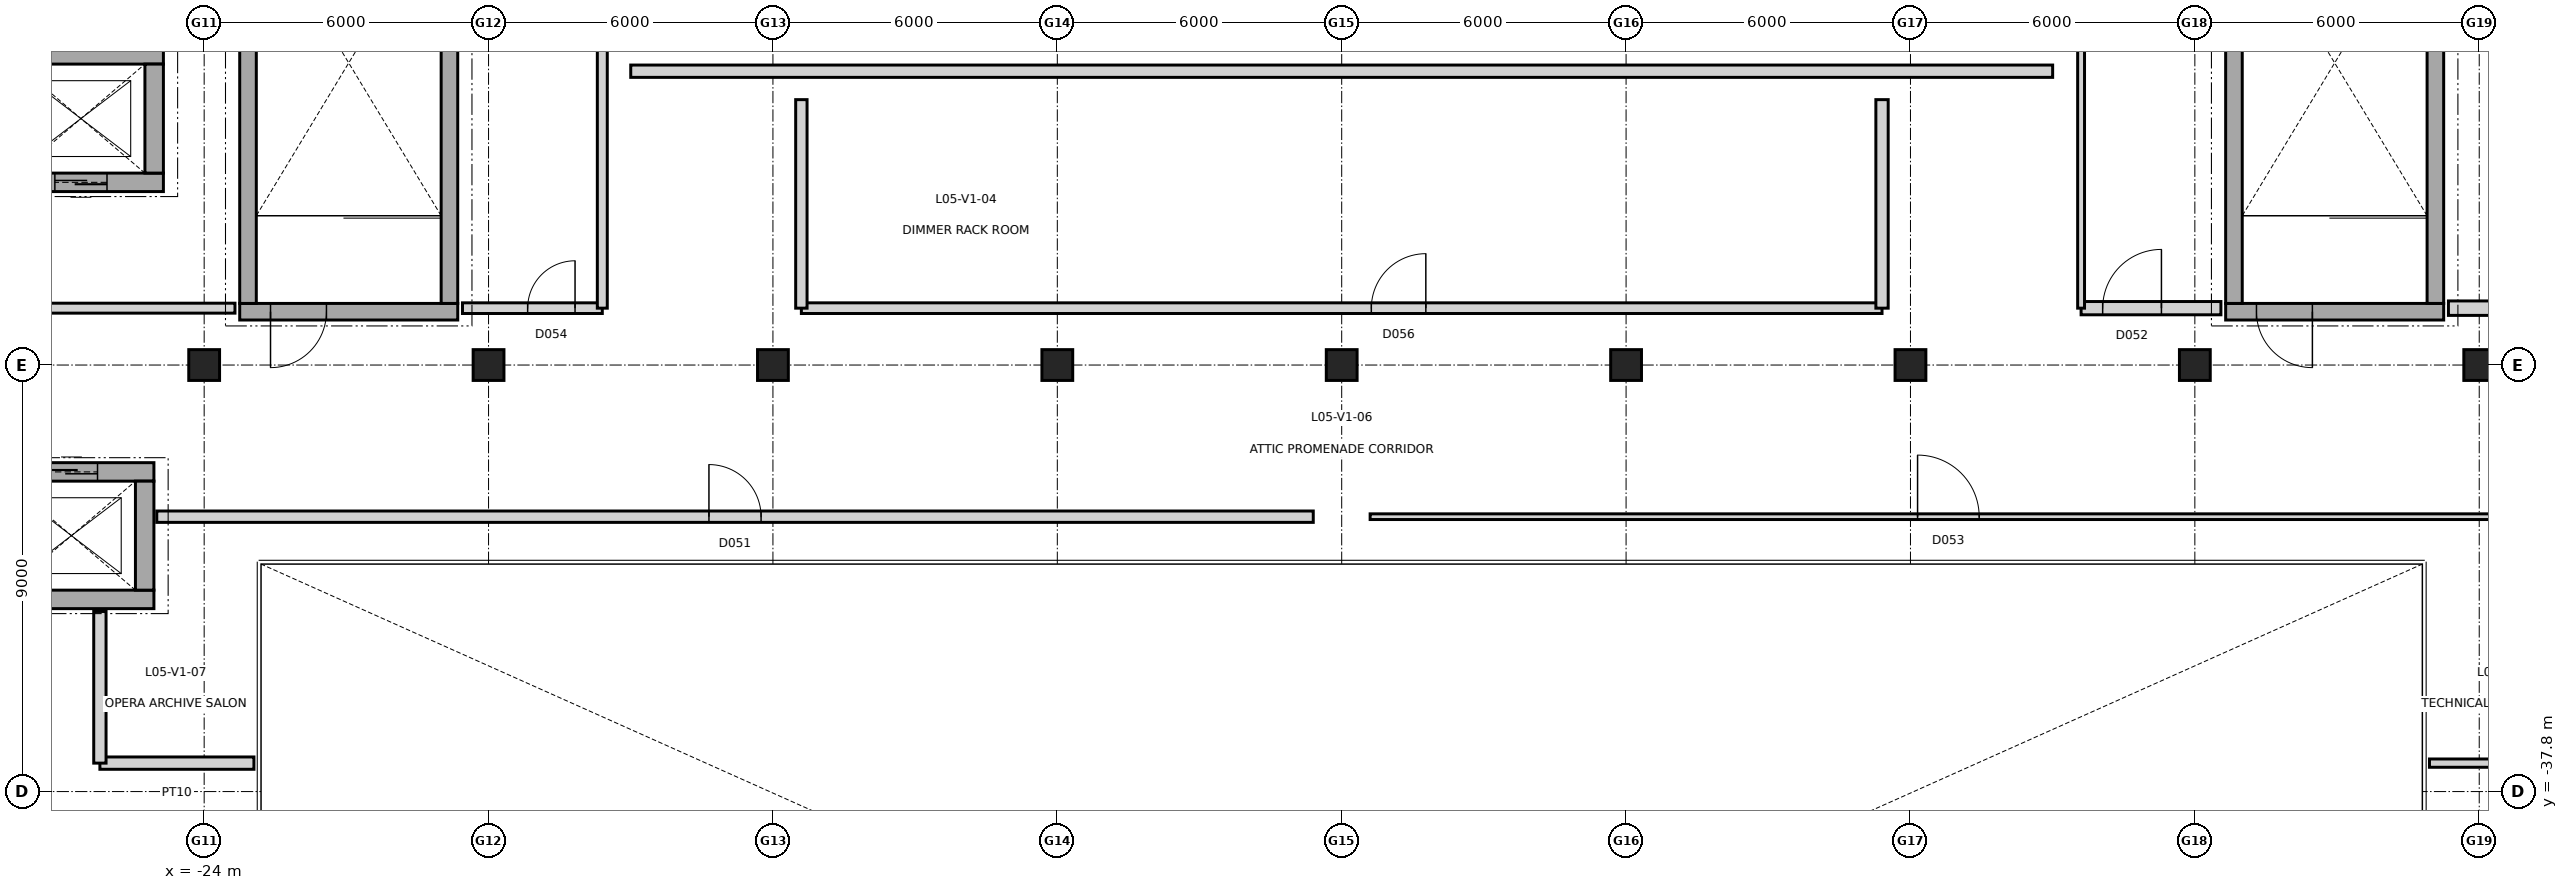
"""IFC4 building model, lengths in metres.
Left out: names, types, materials, properties, quantities, classifications, styles, units other than length and angle.
Written with IfcOpenShell. Run it as: python <this file> out.ifc"""

import sys

from ifc_helpers import new_model, si_unit, direction, frame, frame_2d, origin, origin_2d, place, context, subcontext, project, spatial, rectangle, extrude, element, fill, save


model = new_model("IFC4")
c1 = context("Model", 3, precision=1e-05, world=origin(), true_north=direction((0.0, 1.0)))
c2 = subcontext(c1, "Body", "Model", "MODEL_VIEW")
j1 = project(units=[si_unit("LENGTHUNIT", "METRE"), si_unit("PLANEANGLEUNIT", "RADIAN")], contexts=[c1])
p1 = place(None, origin())
s1 = spatial("IfcSite", under=j1, at=p1, CompositionType="ELEMENT")
p2 = place(p1, origin())
s2 = spatial("IfcBuilding", under=s1, at=p2, CompositionType="ELEMENT")
p3 = place(p2, frame((0.0, 0.0, 24.6)))
s3 = spatial("IfcBuildingStorey", under=s2, at=p3, CompositionType="ELEMENT", Elevation=24.6)
for number, where, z_axis, x_axis in (
    (1, (-24.0, -28.8, 0.0), (0.0, 0.0, 1.0), (1.0, 0.0, 0.0)),
    (2, (-18.0, -28.8, 0.0), (0.0, 0.0, 1.0), (1.0, 0.0, 0.0)),
    (3, (-12.0, -28.8, 0.0), (0.0, 0.0, 1.0), (1.0, 0.0, 0.0)),
    (4, (-6.0, -28.8, 0.0), (0.0, 0.0, 1.0), (1.0, 0.0, 0.0)),
    (5, (0.0, -28.8, 0.0), (0.0, 0.0, 1.0), (1.0, 0.0, 0.0)),
    (6, (6.0, -28.8, 0.0), (0.0, 0.0, 1.0), (1.0, 0.0, 0.0)),
    (7, (12.0, -28.8, 0.0), (0.0, 0.0, 1.0), (1.0, 0.0, 0.0)),
    (8, (18.0, -28.8, 0.0), (0.0, 0.0, 1.0), (1.0, 0.0, 0.0)),
    (9, (24.0, -28.8, 0.0), (0.0, 0.0, 1.0), (1.0, 0.0, 0.0)),
):
    element("IfcColumn", number, at=place(p3, frame(where, z_axis=z_axis, x_axis=x_axis)), inside=s3, PredefinedType="COLUMN", context=c2, shape_type="SweptSolid", body=[
        extrude(rectangle(XDim=0.65, YDim=0.65, at=origin_2d()), origin(), (0.0, 0.0, 1.0), 5.4),
    ])
p4 = place(p3, frame((-18.65, -27.675, 0.0), z_axis=(0.0, 0.0, 1.0), x_axis=(-1.0, 0.0, 0.0)))
e10 = element("IfcWall", 10, at=p4, inside=s3, PredefinedType="SHEAR", context=c2, shape_type="SweptSolid", body=[
    extrude(rectangle(XDim=4.6, YDim=0.35, at=frame_2d((2.3, 0.0))), origin(), (0.0, 0.0, 1.0), 4.645),
])
p5 = place(p4, frame((2.77, 0.0, 0.0)))
e11 = element("IfcOpeningElement", 11, at=p5, cuts=e10, PredefinedType="OPENING", context=c2, shape_type="SweptSolid", body=[
    extrude(rectangle(XDim=1.18, YDim=2.15, at=frame_2d((0.59, 1.075))), frame((0.0, 0.185, 0.0), z_axis=(0.0, -1.0, 0.0), x_axis=(1.0, 0.0, 0.0)), (0.0, 0.0, 1.0), 0.37),
])
for number, where, z_axis, x_axis in (
    (12, (-23.075, -27.5, 0.0), (0.0, 0.0, 1.0), (0.0, 1.0, 0.0)),
    (13, (-18.825, -19.2, 0.0), (0.0, 0.0, 1.0), (0.0, -1.0, 0.0)),
):
    element("IfcWall", number, at=place(p3, frame(where, z_axis=z_axis, x_axis=x_axis)), inside=s3, PredefinedType="SHEAR", context=c2, shape_type="SweptSolid", body=[
        extrude(rectangle(XDim=8.3, YDim=0.35, at=frame_2d((4.15, 0.0))), origin(), (0.0, 0.0, 1.0), 4.645),
    ])
p6 = place(p3, frame((23.25, -27.675, 0.0), z_axis=(0.0, 0.0, 1.0), x_axis=(-1.0, 0.0, 0.0)))
e14 = element("IfcWall", 14, at=p6, inside=s3, PredefinedType="SHEAR", context=c2, shape_type="SweptSolid", body=[
    extrude(rectangle(XDim=4.6, YDim=0.35, at=frame_2d((2.3, 0.0))), origin(), (0.0, 0.0, 1.0), 4.645),
])
p7 = place(p6, frame((2.77, 0.0, 0.0)))
e15 = element("IfcOpeningElement", 15, at=p7, cuts=e14, PredefinedType="OPENING", context=c2, shape_type="SweptSolid", body=[
    extrude(rectangle(XDim=1.18, YDim=2.15, at=frame_2d((0.59, 1.075))), frame((0.0, 0.185, 0.0), z_axis=(0.0, -1.0, 0.0), x_axis=(1.0, 0.0, 0.0)), (0.0, 0.0, 1.0), 0.37),
])
for number, where, z_axis, x_axis in (
    (16, (18.825, -27.5, 0.0), (0.0, 0.0, 1.0), (0.0, 1.0, 0.0)),
    (17, (23.075, -19.2, 0.0), (0.0, 0.0, 1.0), (0.0, -1.0, 0.0)),
):
    element("IfcWall", number, at=place(p3, frame(where, z_axis=z_axis, x_axis=x_axis)), inside=s3, PredefinedType="SHEAR", context=c2, shape_type="SweptSolid", body=[
        extrude(rectangle(XDim=8.3, YDim=0.35, at=frame_2d((4.15, 0.0))), origin(), (0.0, 0.0, 1.0), 4.645),
    ])
p8 = place(p3, frame((-24.86, -24.945, 0.0), z_axis=(0.0, 0.0, 1.0), x_axis=(-1.0, 0.0, 0.0)))
e18 = element("IfcWall", 18, at=p8, inside=s3, PredefinedType="SHEAR", context=c2, shape_type="SweptSolid", body=[
    extrude(rectangle(XDim=3.48, YDim=0.39, at=frame_2d((1.74, 0.0))), origin(), (0.0, 0.0, 1.0), 4.645),
])
p9 = place(p8, frame((1.19, 0.0, 0.0)))
e19 = element("IfcOpeningElement", 19, at=p9, cuts=e18, PredefinedType="OPENING", context=c2, shape_type="SweptSolid", body=[
    extrude(rectangle(XDim=1.1, YDim=2.15, at=frame_2d((0.55, 1.075))), frame((0.0, 0.205, 0.0), z_axis=(0.0, -1.0, 0.0), x_axis=(1.0, 0.0, 0.0)), (0.0, 0.0, 1.0), 0.41),
])
p10 = place(p3, frame((-28.34, -22.255, 0.0), z_axis=(0.0, 0.0, 1.0), x_axis=(1.0, 0.0, 0.0)))
e20 = element("IfcWall", 20, at=p10, inside=s3, PredefinedType="SHEAR", context=c2, shape_type="SweptSolid", body=[
    extrude(rectangle(XDim=3.48, YDim=0.39, at=frame_2d((1.74, 0.0))), origin(), (0.0, 0.0, 1.0), 4.645),
])
p11 = place(p3, frame((-25.055, -22.45, 0.0), z_axis=(0.0, 0.0, 1.0), x_axis=(0.0, -1.0, 0.0)))
e21 = element("IfcWall", 21, at=p11, inside=s3, PredefinedType="SHEAR", context=c2, shape_type="SweptSolid", body=[
    extrude(rectangle(XDim=2.3, YDim=0.39, at=frame_2d((1.15, 0.0))), origin(), (0.0, 0.0, 1.0), 4.645),
])
p12 = place(p3, frame((-25.06, -33.745, 0.0), z_axis=(0.0, 0.0, 1.0), x_axis=(-1.0, 0.0, 0.0)))
e22 = element("IfcWall", 22, at=p12, inside=s3, PredefinedType="SHEAR", context=c2, shape_type="SweptSolid", body=[
    extrude(rectangle(XDim=3.48, YDim=0.39, at=frame_2d((1.74, 0.0))), origin(), (0.0, 0.0, 1.0), 3.619),
])
p13 = place(p3, frame((-28.54, -31.055, 0.0), z_axis=(0.0, 0.0, 1.0), x_axis=(1.0, 0.0, 0.0)))
e23 = element("IfcWall", 23, at=p13, inside=s3, PredefinedType="SHEAR", context=c2, shape_type="SweptSolid", body=[
    extrude(rectangle(XDim=3.48, YDim=0.39, at=frame_2d((1.74, 0.0))), origin(), (0.0, 0.0, 1.0), 3.619),
])
p14 = place(p13, frame((1.19, 0.0, 0.0)))
e24 = element("IfcOpeningElement", 24, at=p14, cuts=e23, PredefinedType="OPENING", context=c2, shape_type="SweptSolid", body=[
    extrude(rectangle(XDim=1.1, YDim=2.15, at=frame_2d((0.55, 1.075))), frame((0.0, 0.205, 0.0), z_axis=(0.0, -1.0, 0.0), x_axis=(1.0, 0.0, 0.0)), (0.0, 0.0, 1.0), 0.41),
])
p15 = place(p3, frame((-25.255, -31.25, 0.0), z_axis=(0.0, 0.0, 1.0), x_axis=(0.0, -1.0, 0.0)))
e25 = element("IfcWall", 25, at=p15, inside=s3, PredefinedType="SHEAR", context=c2, shape_type="SweptSolid", body=[
    extrude(rectangle(XDim=2.3, YDim=0.39, at=frame_2d((1.15, 0.0))), origin(), (0.0, 0.0, 1.0), 3.619),
])
p16 = place(p3, frame((-26.2, -37.2, 0.0), z_axis=(0.0, 0.0, 1.0), x_axis=(1.0, 0.0, 0.0)))
e26 = element("IfcWall", 26, at=p16, inside=s3, PredefinedType="PARTITIONING", context=c2, shape_type="SweptSolid", body=[
    extrude(rectangle(XDim=3.25, YDim=0.26, at=frame_2d((1.625, 0.0))), origin(), (0.0, 0.0, 1.0), 5.02),
])
p17 = place(p3, frame((-25.0, -32.0, 0.0), z_axis=(0.0, 0.0, 1.0), x_axis=(1.0, 0.0, 0.0)))
e27 = element("IfcWall", 27, at=p17, inside=s3, PredefinedType="PARTITIONING", context=c2, shape_type="SweptSolid", body=[
    extrude(rectangle(XDim=24.4, YDim=0.24, at=frame_2d((12.2, 0.0))), origin(), (0.0, 0.0, 1.0), 5.02),
])
p18 = place(p17, frame((11.65, 0.0, 0.0)))
e28 = element("IfcOpeningElement", 28, at=p18, cuts=e27, PredefinedType="OPENING", context=c2, shape_type="SweptSolid", body=[
    extrude(rectangle(XDim=1.1, YDim=2.2, at=frame_2d((0.55, 1.1))), frame((0.0, 0.13, 0.0), z_axis=(0.0, -1.0, 0.0), x_axis=(1.0, 0.0, 0.0)), (0.0, 0.0, 1.0), 0.26),
])
p19 = place(p3, frame((-26.2, -37.2, 0.0), z_axis=(0.0, 0.0, 1.0), x_axis=(0.0, 1.0, 0.0)))
e29 = element("IfcWall", 29, at=p19, inside=s3, PredefinedType="PARTITIONING", context=c2, shape_type="SweptSolid", body=[
    extrude(rectangle(XDim=3.2, YDim=0.26, at=frame_2d((1.6, 0.0))), origin(), (0.0, 0.0, 1.0), 5.02),
])
p20 = place(p3, frame((15.6, -27.6, 0.0), z_axis=(0.0, 0.0, 1.0), x_axis=(1.0, 0.0, 0.0)))
e30 = element("IfcWall", 30, at=p20, inside=s3, PredefinedType="PARTITIONING", context=c2, shape_type="SweptSolid", body=[
    extrude(rectangle(XDim=2.95, YDim=0.28, at=frame_2d((1.475, 0.0))), origin(), (0.0, 0.0, 1.0), 5.02),
])
p21 = place(p20, frame((0.455, 0.0, 0.0)))
e31 = element("IfcOpeningElement", 31, at=p21, cuts=e30, PredefinedType="OPENING", context=c2, shape_type="SweptSolid", body=[
    extrude(rectangle(XDim=1.24, YDim=2.2, at=frame_2d((0.62, 1.1))), frame((0.0, 0.15, 0.0), z_axis=(0.0, -1.0, 0.0), x_axis=(1.0, 0.0, 0.0)), (0.0, 0.0, 1.0), 0.3),
])
p22 = place(p3, frame((23.35, -27.6, 0.0), z_axis=(0.0, 0.0, 1.0), x_axis=(1.0, 0.0, 0.0)))
e32 = element("IfcWall", 32, at=p22, inside=s3, PredefinedType="PARTITIONING", context=c2, shape_type="SweptSolid", body=[
    extrude(rectangle(XDim=5.85, YDim=0.305, at=frame_2d((2.925, 0.0))), origin(), (0.0, 0.0, 1.0), 5.02),
])
p23 = place(p3, frame((15.6, -27.6, 0.0), z_axis=(0.0, 0.0, 1.0), x_axis=(0.0, 1.0, 0.0)))
e33 = element("IfcWall", 33, at=p23, inside=s3, PredefinedType="PARTITIONING", context=c2, shape_type="SweptSolid", body=[
    extrude(rectangle(XDim=9.2, YDim=0.145, at=frame_2d((4.6, 0.0))), origin(), (0.0, 0.0, 1.0), 5.02),
])
p24 = place(p3, frame((22.95, -37.2, 0.0), z_axis=(0.0, 0.0, 1.0), x_axis=(1.0, 0.0, 0.0)))
e34 = element("IfcWall", 34, at=p24, inside=s3, PredefinedType="PARTITIONING", context=c2, shape_type="SweptSolid", body=[
    extrude(rectangle(XDim=3.25, YDim=0.175, at=frame_2d((1.625, 0.0))), origin(), (0.0, 0.0, 1.0), 5.02),
])
p25 = place(p3, frame((0.6, -32.0, 0.0), z_axis=(0.0, 0.0, 1.0), x_axis=(1.0, 0.0, 0.0)))
e35 = element("IfcWall", 35, at=p25, inside=s3, PredefinedType="PARTITIONING", context=c2, shape_type="SweptSolid", body=[
    extrude(rectangle(XDim=24.4, YDim=0.12, at=frame_2d((12.2, 0.0))), origin(), (0.0, 0.0, 1.0), 5.02),
])
p26 = place(p25, frame((11.55, 0.0, 0.0)))
e36 = element("IfcOpeningElement", 36, at=p26, cuts=e35, PredefinedType="OPENING", context=c2, shape_type="SweptSolid", body=[
    extrude(rectangle(XDim=1.3, YDim=2.25, at=frame_2d((0.65, 1.125))), frame((0.0, 0.07, 0.0), z_axis=(0.0, -1.0, 0.0), x_axis=(1.0, 0.0, 0.0)), (0.0, 0.0, 1.0), 0.14),
])
p27 = place(p3, frame((-29.2, -27.6, 0.0), z_axis=(0.0, 0.0, 1.0), x_axis=(1.0, 0.0, 0.0)))
e37 = element("IfcWall", 37, at=p27, inside=s3, PredefinedType="PARTITIONING", context=c2, shape_type="SweptSolid", body=[
    extrude(rectangle(XDim=5.85, YDim=0.21, at=frame_2d((2.925, 0.0))), origin(), (0.0, 0.0, 1.0), 5.02),
])
p28 = place(p3, frame((-18.55, -27.6, 0.0), z_axis=(0.0, 0.0, 1.0), x_axis=(1.0, 0.0, 0.0)))
e38 = element("IfcWall", 38, at=p28, inside=s3, PredefinedType="PARTITIONING", context=c2, shape_type="SweptSolid", body=[
    extrude(rectangle(XDim=2.95, YDim=0.225, at=frame_2d((1.475, 0.0))), origin(), (0.0, 0.0, 1.0), 5.02),
])
p29 = place(p28, frame((1.375, 0.0, 0.0)))
e39 = element("IfcOpeningElement", 39, at=p29, cuts=e38, PredefinedType="OPENING", context=c2, shape_type="SweptSolid", body=[
    extrude(rectangle(XDim=1.0, YDim=2.25, at=frame_2d((0.5, 1.125))), frame((0.0, 0.123, 0.0), z_axis=(0.0, -1.0, 0.0), x_axis=(1.0, 0.0, 0.0)), (0.0, 0.0, 1.0), 0.245),
])
p30 = place(p3, frame((-15.6, -27.6, 0.0), z_axis=(0.0, 0.0, 1.0), x_axis=(0.0, 1.0, 0.0)))
e40 = element("IfcWall", 40, at=p30, inside=s3, PredefinedType="PARTITIONING", context=c2, shape_type="SweptSolid", body=[
    extrude(rectangle(XDim=9.2, YDim=0.21, at=frame_2d((4.6, 0.0))), origin(), (0.0, 0.0, 1.0), 5.02),
])
p31 = place(p3, frame((-15.0, -22.6, 0.0), z_axis=(0.0, 0.0, 1.0), x_axis=(1.0, 0.0, 0.0)))
e41 = element("IfcWall", 41, at=p31, inside=s3, PredefinedType="PARTITIONING", context=c2, shape_type="SweptSolid", body=[
    extrude(rectangle(XDim=30.0, YDim=0.26, at=frame_2d((15.0, 0.0))), origin(), (0.0, 0.0, 1.0), 5.02),
])
p32 = place(p3, frame((-11.4, -27.6, 0.0), z_axis=(0.0, 0.0, 1.0), x_axis=(1.0, 0.0, 0.0)))
e42 = element("IfcWall", 42, at=p32, inside=s3, PredefinedType="PARTITIONING", context=c2, shape_type="SweptSolid", body=[
    extrude(rectangle(XDim=22.8, YDim=0.225, at=frame_2d((11.4, 0.0))), origin(), (0.0, 0.0, 1.0), 5.02),
])
p33 = place(p32, frame((12.025, 0.0, 0.0)))
e43 = element("IfcOpeningElement", 43, at=p33, cuts=e42, PredefinedType="OPENING", context=c2, shape_type="SweptSolid", body=[
    extrude(rectangle(XDim=1.15, YDim=2.3, at=frame_2d((0.575, 1.15))), frame((0.0, 0.123, 0.0), z_axis=(0.0, -1.0, 0.0), x_axis=(1.0, 0.0, 0.0)), (0.0, 0.0, 1.0), 0.245),
])
p34 = place(p3, frame((-11.4, -27.6, 0.0), z_axis=(0.0, 0.0, 1.0), x_axis=(0.0, 1.0, 0.0)))
e44 = element("IfcWall", 44, at=p34, inside=s3, PredefinedType="PARTITIONING", context=c2, shape_type="SweptSolid", body=[
    extrude(rectangle(XDim=4.4, YDim=0.24, at=frame_2d((2.2, 0.0))), origin(), (0.0, 0.0, 1.0), 5.02),
])
p35 = place(p3, frame((11.4, -27.6, 0.0), z_axis=(0.0, 0.0, 1.0), x_axis=(0.0, 1.0, 0.0)))
e45 = element("IfcWall", 45, at=p35, inside=s3, PredefinedType="PARTITIONING", context=c2, shape_type="SweptSolid", body=[
    extrude(rectangle(XDim=4.4, YDim=0.26, at=frame_2d((2.2, 0.0))), origin(), (0.0, 0.0, 1.0), 5.02),
])
p36 = place(p5, origin())
e46 = element("IfcDoor", 46, at=p36, inside=s3, OperationType="SINGLE_SWING_RIGHT", PredefinedType="DOOR", context=c2, shape_type="SweptSolid", body=[
    extrude(rectangle(XDim=1.18, YDim=2.15, at=frame_2d((0.59, 1.075))), frame((0.0, 0.025, 0.0), z_axis=(0.0, -1.0, 0.0), x_axis=(1.0, 0.0, 0.0)), (0.0, 0.0, 1.0), 0.05),
])
fill(e11, e46)
p37 = place(p7, origin())
e47 = element("IfcDoor", 47, at=p37, inside=s3, OperationType="SINGLE_SWING_LEFT", PredefinedType="DOOR", context=c2, shape_type="SweptSolid", body=[
    extrude(rectangle(XDim=1.18, YDim=2.15, at=frame_2d((0.59, 1.075))), frame((0.0, 0.025, 0.0), z_axis=(0.0, -1.0, 0.0), x_axis=(1.0, 0.0, 0.0)), (0.0, 0.0, 1.0), 0.05),
])
fill(e15, e47)
p38 = place(p9, origin())
e48 = element("IfcDoor", 48, at=p38, inside=s3, OperationType="SLIDING_TO_LEFT", PredefinedType="DOOR", context=c2, shape_type="SweptSolid", body=[
    extrude(rectangle(XDim=1.1, YDim=2.15, at=frame_2d((0.55, 1.075))), frame((0.0, 0.025, 0.0), z_axis=(0.0, -1.0, 0.0), x_axis=(1.0, 0.0, 0.0)), (0.0, 0.0, 1.0), 0.05),
])
fill(e19, e48)
p39 = place(p14, origin())
e49 = element("IfcDoor", 49, at=p39, inside=s3, OperationType="SLIDING_TO_LEFT", PredefinedType="DOOR", context=c2, shape_type="SweptSolid", body=[
    extrude(rectangle(XDim=1.1, YDim=2.15, at=frame_2d((0.55, 1.075))), frame((0.0, 0.025, 0.0), z_axis=(0.0, -1.0, 0.0), x_axis=(1.0, 0.0, 0.0)), (0.0, 0.0, 1.0), 0.05),
])
fill(e24, e49)
p40 = place(p18, origin())
e50 = element("IfcDoor", 50, at=p40, inside=s3, OperationType="SINGLE_SWING_LEFT", PredefinedType="DOOR", context=c2, shape_type="SweptSolid", body=[
    extrude(rectangle(XDim=1.1, YDim=2.2, at=frame_2d((0.55, 1.1))), frame((0.0, 0.025, 0.0), z_axis=(0.0, -1.0, 0.0), x_axis=(1.0, 0.0, 0.0)), (0.0, 0.0, 1.0), 0.05),
])
fill(e28, e50)
p41 = place(p21, origin())
e51 = element("IfcDoor", 51, at=p41, inside=s3, OperationType="SINGLE_SWING_RIGHT", PredefinedType="DOOR", context=c2, shape_type="SweptSolid", body=[
    extrude(rectangle(XDim=1.24, YDim=2.2, at=frame_2d((0.62, 1.1))), frame((0.0, 0.025, 0.0), z_axis=(0.0, -1.0, 0.0), x_axis=(1.0, 0.0, 0.0)), (0.0, 0.0, 1.0), 0.05),
])
fill(e31, e51)
p42 = place(p26, origin())
e52 = element("IfcDoor", 52, at=p42, inside=s3, OperationType="SINGLE_SWING_LEFT", PredefinedType="DOOR", context=c2, shape_type="SweptSolid", body=[
    extrude(rectangle(XDim=1.3, YDim=2.25, at=frame_2d((0.65, 1.125))), frame((0.0, 0.025, 0.0), z_axis=(0.0, -1.0, 0.0), x_axis=(1.0, 0.0, 0.0)), (0.0, 0.0, 1.0), 0.05),
])
fill(e36, e52)
p43 = place(p29, origin())
e53 = element("IfcDoor", 53, at=p43, inside=s3, OperationType="SINGLE_SWING_RIGHT", PredefinedType="DOOR", context=c2, shape_type="SweptSolid", body=[
    extrude(rectangle(XDim=1.0, YDim=2.25, at=frame_2d((0.5, 1.125))), frame((0.0, 0.025, 0.0), z_axis=(0.0, -1.0, 0.0), x_axis=(1.0, 0.0, 0.0)), (0.0, 0.0, 1.0), 0.05),
])
fill(e39, e53)
p44 = place(p33, origin())
e54 = element("IfcDoor", 54, at=p44, inside=s3, OperationType="SINGLE_SWING_RIGHT", PredefinedType="DOOR", context=c2, shape_type="SweptSolid", body=[
    extrude(rectangle(XDim=1.15, YDim=2.3, at=frame_2d((0.575, 1.15))), frame((0.0, 0.025, 0.0), z_axis=(0.0, -1.0, 0.0), x_axis=(1.0, 0.0, 0.0)), (0.0, 0.0, 1.0), 0.05),
])
fill(e43, e54)
save(model, sys.argv[1])
